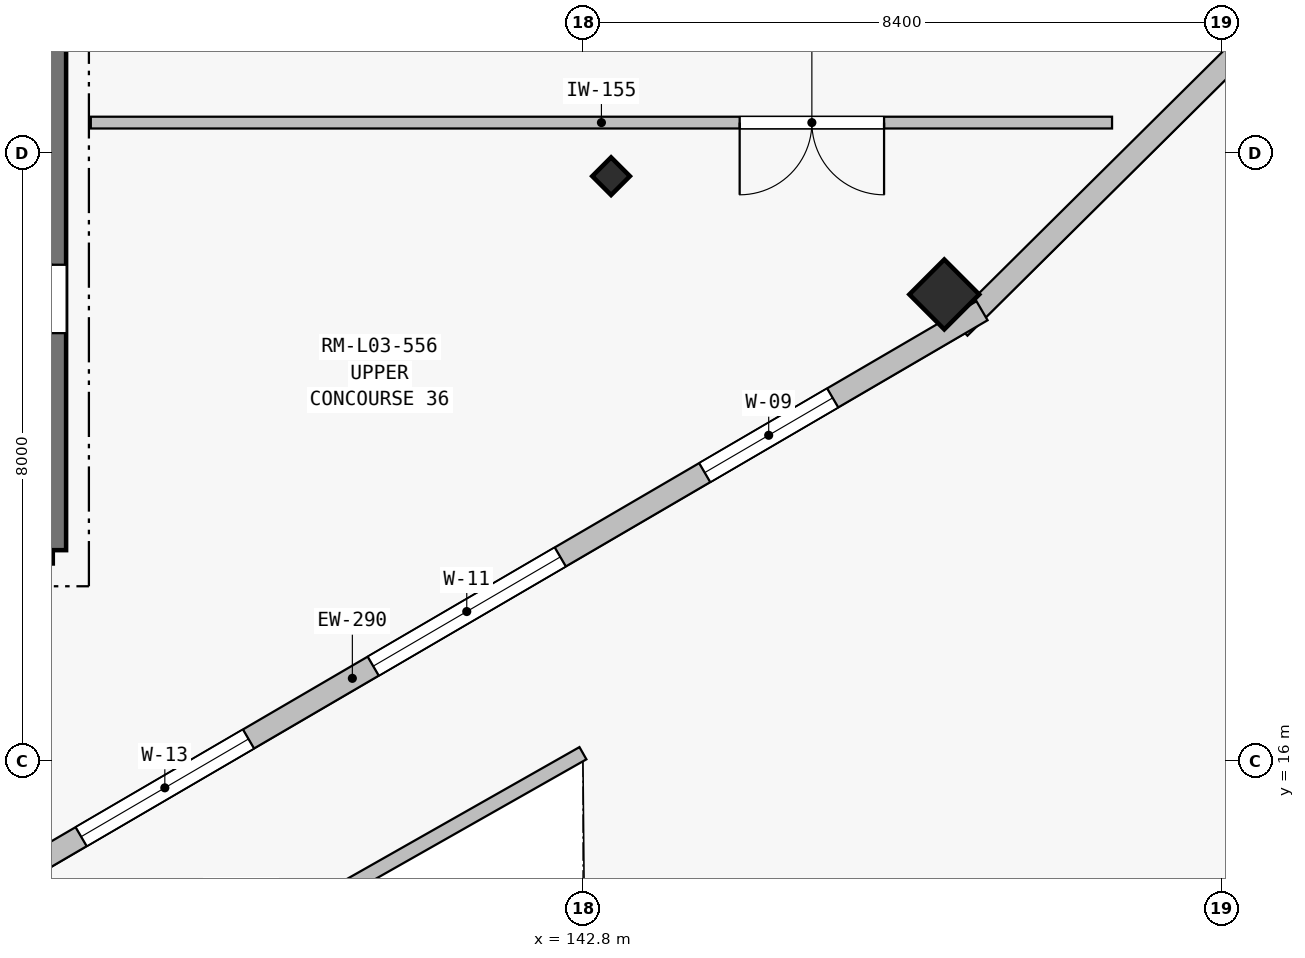
"""IFC4 building model, lengths in metres.
Left out: names, types, materials, properties, quantities, classifications, styles, units other than length and angle.
Written with IfcOpenShell. Run it as: python <this file> out.ifc"""

import sys

from ifc_helpers import new_model, si_unit, direction, frame, frame_2d, origin, origin_2d, place, context, subcontext, project, spatial, rectangle, i_section, extrude, element, fill, save


model = new_model("IFC4")
c1 = context("Model", 3, precision=1e-05, world=origin(), true_north=direction((0.0, 1.0)))
c2 = subcontext(c1, "Body", "Model", "MODEL_VIEW")
j1 = project(units=[si_unit("LENGTHUNIT", "METRE"), si_unit("PLANEANGLEUNIT", "RADIAN")], contexts=[c1])
p1 = place(None, origin())
s1 = spatial("IfcSite", under=j1, at=p1, CompositionType="ELEMENT")
p2 = place(p1, origin())
s2 = spatial("IfcBuilding", under=s1, at=p2, CompositionType="ELEMENT")
p3 = place(p2, frame((0.0, 0.0, 14.4)))
s3 = spatial("IfcBuildingStorey", under=s2, at=p3, CompositionType="ELEMENT", Elevation=14.4)
p4 = place(p3, frame((143.17, 23.695, 0.0), z_axis=(0.0, 0.0, 1.0), x_axis=(0.707106781187, -0.707106781187, 0.0)))
e1 = element("IfcColumn", 1, at=p4, inside=s3, PredefinedType="COLUMN", context=c2, shape_type="SweptSolid", body=[
    extrude(i_section(OverallWidth=0.35, OverallDepth=0.35, WebThickness=0.014, FlangeThickness=0.024, at=origin_2d()), origin(), (0.0, 0.0, 1.0), 4.5),
])
p5 = place(p3, frame((147.554, 22.139, 0.0), z_axis=(0.0, 0.0, 1.0), x_axis=(0.707106781187, -0.707106781187, 0.0)))
e2 = element("IfcColumn", 2, at=p5, inside=s3, PredefinedType="COLUMN", context=c2, shape_type="SweptSolid", body=[
    extrude(rectangle(XDim=0.65, YDim=0.65, at=origin_2d()), origin(), (0.0, 0.0, 1.0), 4.26),
])
p6 = place(p3, frame((160.487, 34.321, 0.0), z_axis=(0.0, 0.0, 1.0), x_axis=(-0.710110182589, -0.704090568452, 0.0)))
e3 = element("IfcWall", 3, at=p6, inside=s3, PredefinedType="SOLIDWALL", context=c2, shape_type="SweptSolid", body=[
    extrude(rectangle(XDim=17.927, YDim=0.29, at=frame_2d((8.963, 0.0))), origin(), (0.0, 0.0, 1.0), 4.26),
])
p7 = place(p6, frame((2.125, 0.0, 0.9)))
e4 = element("IfcOpeningElement", 4, at=p7, cuts=e3, PredefinedType="OPENING", context=c2, shape_type="SweptSolid", body=[
    extrude(rectangle(XDim=2.25, YDim=2.1, at=frame_2d((1.125, 1.05))), frame((0.0, 0.155, 0.0), z_axis=(0.0, -1.0, 0.0), x_axis=(1.0, 0.0, 0.0)), (0.0, 0.0, 1.0), 0.31),
])
p8 = place(p6, frame((6.875, 0.0, 0.9)))
e5 = element("IfcOpeningElement", 5, at=p8, cuts=e3, PredefinedType="OPENING", context=c2, shape_type="SweptSolid", body=[
    extrude(rectangle(XDim=1.95, YDim=2.0, at=frame_2d((0.975, 1.0))), frame((0.0, 0.155, 0.0), z_axis=(0.0, -1.0, 0.0), x_axis=(1.0, 0.0, 0.0)), (0.0, 0.0, 1.0), 0.31),
])
p9 = place(p3, frame((148.051, 21.925, 0.0), z_axis=(0.0, 0.0, 1.0), x_axis=(-0.863607623942, -0.504164528572, 0.0)))
e6 = element("IfcWall", 6, at=p9, inside=s3, PredefinedType="SOLIDWALL", context=c2, shape_type="SweptSolid", body=[
    extrude(rectangle(XDim=19.186, YDim=0.29, at=frame_2d((9.593, 0.0))), origin(), (0.0, 0.0, 1.0), 4.26),
])
p10 = place(p9, frame((16.401, 0.0, 0.0)))
e7 = element("IfcOpeningElement", 7, at=p10, cuts=e6, PredefinedType="OPENING", context=c2, shape_type="SweptSolid", body=[
    extrude(rectangle(XDim=1.55, YDim=2.3, at=frame_2d((0.775, 1.15))), frame((0.0, 0.155, 0.0), z_axis=(0.0, -1.0, 0.0), x_axis=(1.0, 0.0, 0.0)), (0.0, 0.0, 1.0), 0.31),
])
p11 = place(p9, frame((2.275, 0.0, 0.9)))
e8 = element("IfcOpeningElement", 8, at=p11, cuts=e6, PredefinedType="OPENING", context=c2, shape_type="SweptSolid", body=[
    extrude(rectangle(XDim=1.95, YDim=2.0, at=frame_2d((0.975, 1.0))), frame((0.0, 0.155, 0.0), z_axis=(0.0, -1.0, 0.0), x_axis=(1.0, 0.0, 0.0)), (0.0, 0.0, 1.0), 0.31),
])
p12 = place(p9, frame((6.425, 0.0, 0.9)))
e9 = element("IfcOpeningElement", 9, at=p12, cuts=e6, PredefinedType="OPENING", context=c2, shape_type="SweptSolid", body=[
    extrude(rectangle(XDim=2.85, YDim=1.6, at=frame_2d((1.425, 0.8))), frame((0.0, 0.155, 0.0), z_axis=(0.0, -1.0, 0.0), x_axis=(1.0, 0.0, 0.0)), (0.0, 0.0, 1.0), 0.31),
])
p13 = place(p9, frame((11.175, 0.0, 0.9)))
e10 = element("IfcOpeningElement", 10, at=p13, cuts=e6, PredefinedType="OPENING", context=c2, shape_type="SweptSolid", body=[
    extrude(rectangle(XDim=2.55, YDim=1.55, at=frame_2d((1.275, 0.775))), frame((0.0, 0.155, 0.0), z_axis=(0.0, -1.0, 0.0), x_axis=(1.0, 0.0, 0.0)), (0.0, 0.0, 1.0), 0.31),
])
p14 = place(p3, frame((142.8, 16.104, 0.0), z_axis=(0.0, 0.0, 1.0), x_axis=(-0.869846022988, -0.493323318213, 0.0)))
e11 = element("IfcWall", 11, at=p14, inside=s3, PredefinedType="PARAPET", context=c2, shape_type="SweptSolid", body=[
    extrude(rectangle(XDim=10.347, YDim=0.185, at=frame_2d((5.173, 0.0))), origin(), (0.0, 0.0, 1.0), 0.85),
])
p15 = place(p3, frame((127.775, 18.775, 0.0), z_axis=(0.0, 0.0, 1.0), x_axis=(1.0, 0.0, 0.0)))
e12 = element("IfcWall", 12, at=p15, inside=s3, PredefinedType="SHEAR", context=c2, shape_type="SweptSolid", body=[
    extrude(rectangle(XDim=8.05, YDim=0.35, at=frame_2d((4.025, 0.0))), origin(), (0.0, 0.0, 1.0), 4.5),
])
p16 = place(p3, frame((135.825, 18.775, 0.0), z_axis=(0.0, 0.0, 1.0), x_axis=(0.0, 1.0, 0.0)))
e13 = element("IfcWall", 13, at=p16, inside=s3, PredefinedType="SHEAR", context=c2, shape_type="SweptSolid", body=[
    extrude(rectangle(XDim=14.85, YDim=0.35, at=frame_2d((7.425, 0.0))), origin(), (0.0, 0.0, 1.0), 4.5),
])
p17 = place(p16, frame((2.855, 0.0, 0.0)))
e14 = element("IfcOpeningElement", 14, at=p17, cuts=e13, PredefinedType="OPENING", context=c2, shape_type="SweptSolid", body=[
    extrude(rectangle(XDim=0.9, YDim=2.1, at=frame_2d((0.45, 1.05))), frame((0.0, 0.185, 0.0), z_axis=(0.0, -1.0, 0.0), x_axis=(1.0, 0.0, 0.0)), (0.0, 0.0, 1.0), 0.37),
])
p18 = place(p3, frame((149.762, 24.4, 0.0), z_axis=(0.0, 0.0, 1.0), x_axis=(-1.0, 0.0, 0.0)))
e15 = element("IfcWall", 15, at=p18, inside=s3, PredefinedType="PARTITIONING", context=c2, shape_type="SweptSolid", body=[
    extrude(rectangle(XDim=13.437, YDim=0.155, at=frame_2d((6.718, 0.0))), origin(), (0.0, 0.0, 1.0), 3.543),
])
p19 = place(p18, frame((3.0, 0.0, 0.0)))
e16 = element("IfcOpeningElement", 16, at=p19, cuts=e15, PredefinedType="OPENING", context=c2, shape_type="SweptSolid", body=[
    extrude(rectangle(XDim=1.9, YDim=2.35, at=frame_2d((0.95, 1.175))), frame((0.0, 0.087, 0.0), z_axis=(0.0, -1.0, 0.0), x_axis=(1.0, 0.0, 0.0)), (0.0, 0.0, 1.0), 0.175),
])
p20 = place(p11, origin())
e17 = element("IfcWindow", 17, at=p20, inside=s3, PartitioningType="SINGLE_PANEL", PredefinedType="WINDOW", context=c2, shape_type="SweptSolid", body=[
    extrude(rectangle(XDim=1.95, YDim=2.0, at=frame_2d((0.975, 1.0))), frame((0.0, 0.03, 0.0), z_axis=(0.0, -1.0, 0.0), x_axis=(1.0, 0.0, 0.0)), (0.0, 0.0, 1.0), 0.06),
])
fill(e8, e17)
p21 = place(p12, origin())
e18 = element("IfcWindow", 18, at=p21, inside=s3, PartitioningType="SINGLE_PANEL", PredefinedType="WINDOW", context=c2, shape_type="SweptSolid", body=[
    extrude(rectangle(XDim=2.85, YDim=1.6, at=frame_2d((1.425, 0.8))), frame((0.0, 0.03, 0.0), z_axis=(0.0, -1.0, 0.0), x_axis=(1.0, 0.0, 0.0)), (0.0, 0.0, 1.0), 0.06),
])
fill(e9, e18)
p22 = place(p13, origin())
e19 = element("IfcWindow", 19, at=p22, inside=s3, PartitioningType="SINGLE_PANEL", PredefinedType="WINDOW", context=c2, shape_type="SweptSolid", body=[
    extrude(rectangle(XDim=2.55, YDim=1.55, at=frame_2d((1.275, 0.775))), frame((0.0, 0.03, 0.0), z_axis=(0.0, -1.0, 0.0), x_axis=(1.0, 0.0, 0.0)), (0.0, 0.0, 1.0), 0.06),
])
fill(e10, e19)
p23 = place(p17, origin())
e20 = element("IfcDoor", 20, at=p23, inside=s3, OperationType="SINGLE_SWING_RIGHT", PredefinedType="DOOR", context=c2, shape_type="SweptSolid", body=[
    extrude(rectangle(XDim=0.9, YDim=2.1, at=frame_2d((0.45, 1.05))), frame((0.0, 0.025, 0.0), z_axis=(0.0, -1.0, 0.0), x_axis=(1.0, 0.0, 0.0)), (0.0, 0.0, 1.0), 0.05),
])
fill(e14, e20)
p24 = place(p19, origin())
e21 = element("IfcDoor", 21, at=p24, inside=s3, OperationType="DOUBLE_DOOR_SINGLE_SWING", PredefinedType="DOOR", context=c2, shape_type="SweptSolid", body=[
    extrude(rectangle(XDim=1.9, YDim=2.35, at=frame_2d((0.95, 1.175))), frame((0.0, 0.025, 0.0), z_axis=(0.0, -1.0, 0.0), x_axis=(1.0, 0.0, 0.0)), (0.0, 0.0, 1.0), 0.05),
])
fill(e16, e21)
save(model, sys.argv[1])
